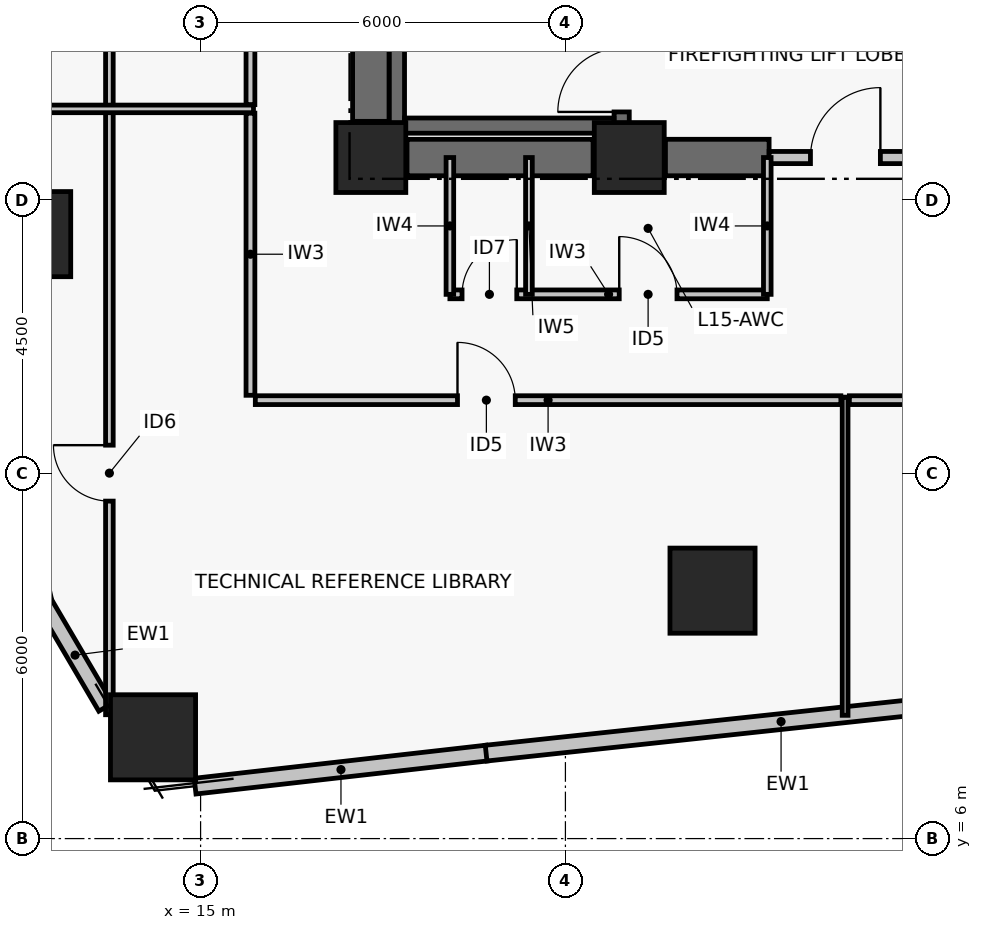
"""IFC4 building model, lengths in metres.
Left out: names, types, materials, properties, quantities, classifications, styles, units other than length and angle.
Written with IfcOpenShell. Run it as: python <this file> out.ifc"""

import sys

from ifc_helpers import new_model, si_unit, direction, frame, frame_2d, origin, origin_2d, place, context, subcontext, project, spatial, rectangle, hollow_rectangle, extrude, element, fill, save


model = new_model("IFC4")
c1 = context("Model", 3, precision=1e-05, world=origin(), true_north=direction((0.0, 1.0)))
c2 = subcontext(c1, "Body", "Model", "MODEL_VIEW")
j1 = project(units=[si_unit("LENGTHUNIT", "METRE"), si_unit("PLANEANGLEUNIT", "RADIAN")], contexts=[c1])
p1 = place(None, origin())
s1 = spatial("IfcSite", under=j1, at=p1, CompositionType="ELEMENT")
p2 = place(p1, origin())
s2 = spatial("IfcBuilding", under=s1, at=p2, CompositionType="ELEMENT")
p3 = place(p2, frame((0.0, 0.0, 64.8)))
s3 = spatial("IfcBuildingStorey", under=s2, at=p3, CompositionType="ELEMENT", Elevation=64.8)
for number, where, z_axis, x_axis in (
    (1, (17.8, 17.2, 0.0), (0.0, 0.0, 1.0), (1.0, 0.0, 0.0)),
    (2, (22.05, 17.2, 0.0), (0.0, 0.0, 1.0), (1.0, 0.0, 0.0)),
):
    element("IfcColumn", number, at=place(p3, frame(where, z_axis=z_axis, x_axis=x_axis)), inside=s3, PredefinedType="COLUMN", context=c2, shape_type="SweptSolid", body=[
        extrude(rectangle(XDim=1.15, YDim=1.15, at=origin_2d()), origin(), (0.0, 0.0, 1.0), 3.72),
    ])
p4 = place(p3, frame((18.395, 17.2, 0.0), z_axis=(0.0, 0.0, 1.0), x_axis=(1.0, 0.0, 0.0)))
e3 = element("IfcWall", 3, at=p4, inside=s3, PredefinedType="SHEAR", context=c2, shape_type="SweptSolid", body=[
    extrude(rectangle(XDim=3.06, YDim=0.6, at=frame_2d((1.53, 0.0))), origin(), (0.0, 0.0, 1.0), 3.44),
])
p5 = place(p3, frame((22.645, 17.2, 0.0), z_axis=(0.0, 0.0, 1.0), x_axis=(1.0, 0.0, 0.0)))
e4 = element("IfcWall", 4, at=p5, inside=s3, PredefinedType="SHEAR", context=c2, shape_type="SweptSolid", body=[
    extrude(rectangle(XDim=1.705, YDim=0.6, at=frame_2d((0.853, 0.0))), origin(), (0.0, 0.0, 1.0), 3.44),
])
p6 = place(p3, frame((17.8, 17.795, 0.0), z_axis=(0.0, 0.0, 1.0), x_axis=(0.0, 1.0, 0.0)))
e5 = element("IfcWall", 5, at=p6, inside=s3, PredefinedType="SHEAR", context=c2, shape_type="SweptSolid", body=[
    extrude(rectangle(XDim=8.41, YDim=0.6, at=frame_2d((4.205, 0.0))), origin(), (0.0, 0.0, 1.0), 3.44),
])
p7 = place(p3, frame((18.229, 17.6, 0.0), z_axis=(0.0, 0.0, 1.0), x_axis=(0.0, 1.0, 0.0)))
e6 = element("IfcWall", 6, at=p7, inside=s3, PredefinedType="SHEAR", context=c2, shape_type="SweptSolid", body=[
    extrude(rectangle(XDim=8.8, YDim=0.25, at=frame_2d((4.4, 0.0))), origin(), (0.0, 0.0, 1.0), 3.44),
])
p8 = place(p3, frame((21.925, 17.6, 0.0), z_axis=(0.0, 0.0, 1.0), x_axis=(0.0, 1.0, 0.0)))
e7 = element("IfcWall", 7, at=p8, inside=s3, PredefinedType="SHEAR", context=c2, shape_type="SweptSolid", body=[
    extrude(rectangle(XDim=8.8, YDim=0.25, at=frame_2d((4.4, 0.0))), origin(), (0.0, 0.0, 1.0), 3.44),
])
p9 = place(p8, frame((0.35, 0.0, 0.0)))
e8 = element("IfcOpeningElement", 8, at=p9, cuts=e7, PredefinedType="OPENING", context=c2, shape_type="SweptSolid", body=[
    extrude(rectangle(XDim=1.05, YDim=2.08, at=frame_2d((0.525, 1.04))), frame((0.0, 0.135, 0.0), z_axis=(0.0, -1.0, 0.0), x_axis=(1.0, 0.0, 0.0)), (0.0, 0.0, 1.0), 0.27),
])
p10 = place(p3, frame((18.354, 17.725, 0.0), z_axis=(0.0, 0.0, 1.0), x_axis=(1.0, 0.0, 0.0)))
e9 = element("IfcWall", 9, at=p10, inside=s3, PredefinedType="SHEAR", context=c2, shape_type="SweptSolid", body=[
    extrude(rectangle(XDim=3.446, YDim=0.25, at=frame_2d((1.723, 0.0))), origin(), (0.0, 0.0, 1.0), 3.44),
])
for number, where, z_axis, x_axis in (
    (10, (12.164, 15.94, 0.0), (0.0, 0.0, 1.0), (1.0, 0.0, 0.0)),
    (11, (14.218, 7.666, 0.0), (0.0, 0.0, 1.0), (1.0, 0.0, 0.0)),
    (12, (23.419, 10.077, 0.0), (0.0, 0.0, 1.0), (1.0, 0.0, 0.0)),
):
    element("IfcColumn", number, at=place(p3, frame(where, z_axis=z_axis, x_axis=x_axis)), inside=s3, PredefinedType="COLUMN", context=c2, shape_type="SweptSolid", body=[
        extrude(hollow_rectangle(XDim=1.4, YDim=1.4, WallThickness=0.055, at=origin_2d()), origin(), (0.0, 0.0, 1.0), 3.72),
    ])
p11 = place(p3, frame((13.438, 8.161, 0.0), z_axis=(0.0, 0.0, 1.0), x_axis=(-0.506772954594, 0.862079562739, 0.0)))
e13 = element("IfcWall", 13, at=p11, inside=s3, PredefinedType="PARTITIONING", context=c2, shape_type="SweptSolid", body=[
    extrude(rectangle(XDim=1.986, YDim=0.26, at=frame_2d((0.993, 0.0))), origin(), (0.0, 0.0, 1.0), 3.44),
])
p12 = place(p3, frame((19.708, 7.406, 0.0), z_axis=(0.0, 0.0, 1.0), x_axis=(-0.993630237788, -0.112689620435, 0.0)))
e14 = element("IfcWall", 14, at=p12, inside=s3, PredefinedType="PARTITIONING", context=c2, shape_type="SweptSolid", body=[
    extrude(rectangle(XDim=4.829, YDim=0.26, at=frame_2d((2.415, 0.0))), origin(), (0.0, 0.0, 1.0), 3.44),
])
p13 = place(p3, frame((29.398, 8.444, 0.0), z_axis=(0.0, 0.0, 1.0), x_axis=(-0.994319088673, -0.106440358419, 0.0)))
e15 = element("IfcWall", 15, at=p13, inside=s3, PredefinedType="PARTITIONING", context=c2, shape_type="SweptSolid", body=[
    extrude(rectangle(XDim=9.757, YDim=0.26, at=frame_2d((4.879, 0.0))), origin(), (0.0, 0.0, 1.0), 3.44),
])
p14 = place(p3, frame((24.35, 17.2, 0.0), z_axis=(0.0, 0.0, 1.0), x_axis=(1.0, 0.0, 0.0)))
e16 = element("IfcWall", 16, at=p14, inside=s3, PredefinedType="PARTITIONING", context=c2, shape_type="SweptSolid", body=[
    extrude(rectangle(XDim=2.5, YDim=0.2, at=frame_2d((1.25, 0.0))), origin(), (0.0, 0.0, 1.0), 2.57),
])
p15 = place(p14, frame((0.68, 0.0, 0.0)))
e17 = element("IfcOpeningElement", 17, at=p15, cuts=e16, PredefinedType="OPENING", context=c2, shape_type="SweptSolid", body=[
    extrude(rectangle(XDim=1.15, YDim=2.08, at=frame_2d((0.575, 1.04))), frame((0.0, 0.11, 0.0), z_axis=(0.0, -1.0, 0.0), x_axis=(1.0, 0.0, 0.0)), (0.0, 0.0, 1.0), 0.22),
])
p16 = place(p3, frame((19.1, 14.95, 0.0), z_axis=(0.0, 0.0, 1.0), x_axis=(1.0, 0.0, 0.0)))
e18 = element("IfcWall", 18, at=p16, inside=s3, PredefinedType="PARTITIONING", context=c2, shape_type="SweptSolid", body=[
    extrude(rectangle(XDim=5.22, YDim=0.145, at=frame_2d((2.61, 0.0))), origin(), (0.0, 0.0, 1.0), 2.57),
])
p17 = place(p16, frame((0.2, 0.0, 0.0)))
e19 = element("IfcOpeningElement", 19, at=p17, cuts=e18, PredefinedType="OPENING", context=c2, shape_type="SweptSolid", body=[
    extrude(rectangle(XDim=0.9, YDim=2.02, at=frame_2d((0.45, 1.01))), frame((0.0, 0.083, 0.0), z_axis=(0.0, -1.0, 0.0), x_axis=(1.0, 0.0, 0.0)), (0.0, 0.0, 1.0), 0.165),
])
p18 = place(p16, frame((2.785, 0.0, 0.0)))
e20 = element("IfcOpeningElement", 20, at=p18, cuts=e18, PredefinedType="OPENING", context=c2, shape_type="SweptSolid", body=[
    extrude(rectangle(XDim=0.95, YDim=2.06, at=frame_2d((0.475, 1.03))), frame((0.0, 0.083, 0.0), z_axis=(0.0, -1.0, 0.0), x_axis=(1.0, 0.0, 0.0)), (0.0, 0.0, 1.0), 0.165),
])
p19 = place(p3, frame((19.1, 14.95, 0.0), z_axis=(0.0, 0.0, 1.0), x_axis=(0.0, 1.0, 0.0)))
e21 = element("IfcWall", 21, at=p19, inside=s3, PredefinedType="PARTITIONING", context=c2, shape_type="SweptSolid", body=[
    extrude(rectangle(XDim=2.25, YDim=0.125, at=frame_2d((1.125, 0.0))), origin(), (0.0, 0.0, 1.0), 2.57),
])
p20 = place(p3, frame((20.4, 14.95, 0.0), z_axis=(0.0, 0.0, 1.0), x_axis=(0.0, 1.0, 0.0)))
e22 = element("IfcWall", 22, at=p20, inside=s3, PredefinedType="PARTITIONING", context=c2, shape_type="SweptSolid", body=[
    extrude(rectangle(XDim=2.25, YDim=0.11, at=frame_2d((1.125, 0.0))), origin(), (0.0, 0.0, 1.0), 2.57),
])
p21 = place(p3, frame((24.32, 14.95, 0.0), z_axis=(0.0, 0.0, 1.0), x_axis=(0.0, 1.0, 0.0)))
e23 = element("IfcWall", 23, at=p21, inside=s3, PredefinedType="PARTITIONING", context=c2, shape_type="SweptSolid", body=[
    extrude(rectangle(XDim=2.25, YDim=0.125, at=frame_2d((1.125, 0.0))), origin(), (0.0, 0.0, 1.0), 2.57),
])
p22 = place(p3, frame((15.82, 17.93, 0.0), z_axis=(0.0, 0.0, 1.0), x_axis=(0.0, -1.0, 0.0)))
e24 = element("IfcWall", 24, at=p22, inside=s3, PredefinedType="PARTITIONING", context=c2, shape_type="SweptSolid", body=[
    extrude(rectangle(XDim=4.64, YDim=0.145, at=frame_2d((2.32, 0.0))), origin(), (0.0, 0.0, 1.0), 2.57),
])
p23 = place(p3, frame((15.9, 13.21, 0.0), z_axis=(0.0, 0.0, 1.0), x_axis=(1.0, 0.0, 0.0)))
e25 = element("IfcWall", 25, at=p23, inside=s3, PredefinedType="PARTITIONING", context=c2, shape_type="SweptSolid", body=[
    extrude(rectangle(XDim=9.63, YDim=0.145, at=frame_2d((4.815, 0.0))), origin(), (0.0, 0.0, 1.0), 2.57),
])
p24 = place(p23, frame((3.325, 0.0, 0.0)))
e26 = element("IfcOpeningElement", 26, at=p24, cuts=e25, PredefinedType="OPENING", context=c2, shape_type="SweptSolid", body=[
    extrude(rectangle(XDim=0.95, YDim=2.06, at=frame_2d((0.475, 1.03))), frame((0.0, 0.083, 0.0), z_axis=(0.0, -1.0, 0.0), x_axis=(1.0, 0.0, 0.0)), (0.0, 0.0, 1.0), 0.165),
])
p25 = place(p3, frame((25.67, 13.21, 0.0), z_axis=(0.0, 0.0, 1.0), x_axis=(1.0, 0.0, 0.0)))
e27 = element("IfcWall", 27, at=p25, inside=s3, PredefinedType="PARTITIONING", context=c2, shape_type="SweptSolid", body=[
    extrude(rectangle(XDim=7.13, YDim=0.145, at=frame_2d((3.565, 0.0))), origin(), (0.0, 0.0, 1.0), 2.82),
])
p26 = place(p25, frame((5.224, 0.0, 0.0)))
e28 = element("IfcOpeningElement", 28, at=p26, cuts=e27, PredefinedType="OPENING", context=c2, shape_type="SweptSolid", body=[
    extrude(rectangle(XDim=0.92, YDim=2.05, at=frame_2d((0.46, 1.025))), frame((0.0, 0.083, 0.0), z_axis=(0.0, -1.0, 0.0), x_axis=(1.0, 0.0, 0.0)), (0.0, 0.0, 1.0), 0.165),
])
p27 = place(p3, frame((15.82, 25.93, 0.0), z_axis=(0.0, 0.0, 1.0), x_axis=(0.0, -1.0, 0.0)))
e29 = element("IfcWall", 29, at=p27, inside=s3, PredefinedType="PARTITIONING", context=c2, shape_type="SweptSolid", body=[
    extrude(rectangle(XDim=7.86, YDim=0.145, at=frame_2d((3.93, 0.0))), origin(), (0.0, 0.0, 1.0), 2.97),
])
p28 = place(p27, frame((3.455, 0.0, 0.0)))
e30 = element("IfcOpeningElement", 30, at=p28, cuts=e29, PredefinedType="OPENING", context=c2, shape_type="SweptSolid", body=[
    extrude(rectangle(XDim=0.95, YDim=2.06, at=frame_2d((0.475, 1.03))), frame((0.0, 0.083, 0.0), z_axis=(0.0, -1.0, 0.0), x_axis=(1.0, 0.0, 0.0)), (0.0, 0.0, 1.0), 0.165),
])
p29 = place(p3, frame((13.5, 8.037, 0.0), z_axis=(0.0, 0.0, 1.0), x_axis=(0.0, 1.0, 0.0)))
e31 = element("IfcWall", 31, at=p29, inside=s3, PredefinedType="PARTITIONING", context=c2, shape_type="SweptSolid", body=[
    extrude(rectangle(XDim=27.926, YDim=0.125, at=frame_2d((13.963, 0.0))), origin(), (0.0, 0.0, 1.0), 2.57),
])
p30 = place(p29, frame((3.513, 0.0, 0.0)))
e32 = element("IfcOpeningElement", 32, at=p30, cuts=e31, PredefinedType="OPENING", context=c2, shape_type="SweptSolid", body=[
    extrude(rectangle(XDim=0.92, YDim=2.05, at=frame_2d((0.46, 1.025))), frame((0.0, 0.073, 0.0), z_axis=(0.0, -1.0, 0.0), x_axis=(1.0, 0.0, 0.0)), (0.0, 0.0, 1.0), 0.145),
])
p31 = place(p29, frame((23.493, 0.0, 0.0)))
e33 = element("IfcOpeningElement", 33, at=p31, cuts=e31, PredefinedType="OPENING", context=c2, shape_type="SweptSolid", body=[
    extrude(rectangle(XDim=0.92, YDim=2.05, at=frame_2d((0.46, 1.025))), frame((0.0, 0.073, 0.0), z_axis=(0.0, -1.0, 0.0), x_axis=(1.0, 0.0, 0.0)), (0.0, 0.0, 1.0), 0.145),
])
p32 = place(p29, frame((13.503, 0.0, 0.0)))
e34 = element("IfcOpeningElement", 34, at=p32, cuts=e31, PredefinedType="OPENING", context=c2, shape_type="SweptSolid", body=[
    extrude(rectangle(XDim=0.92, YDim=2.05, at=frame_2d((0.46, 1.025))), frame((0.0, 0.073, 0.0), z_axis=(0.0, -1.0, 0.0), x_axis=(1.0, 0.0, 0.0)), (0.0, 0.0, 1.0), 0.145),
])
p33 = place(p3, frame((25.6, 8.027, 0.0), z_axis=(0.0, 0.0, 1.0), x_axis=(0.0, 1.0, 0.0)))
e35 = element("IfcWall", 35, at=p33, inside=s3, PredefinedType="PARTITIONING", context=c2, shape_type="SweptSolid", body=[
    extrude(rectangle(XDim=5.233, YDim=0.095, at=frame_2d((2.616, 0.0))), origin(), (0.0, 0.0, 1.0), 2.82),
])
p34 = place(p3, frame((10.9, 18.0, 0.0), z_axis=(0.0, 0.0, 1.0), x_axis=(1.0, 0.0, 0.0)))
e36 = element("IfcWall", 36, at=p34, inside=s3, PredefinedType="PARTITIONING", context=c2, shape_type="SweptSolid", body=[
    extrude(rectangle(XDim=4.97, YDim=0.125, at=frame_2d((2.485, 0.0))), origin(), (0.0, 0.0, 1.0), 2.82),
])
p35 = place(p9, origin())
e37 = element("IfcDoor", 37, at=p35, inside=s3, OperationType="SINGLE_SWING_LEFT", PredefinedType="DOOR", context=c2, shape_type="SweptSolid", body=[
    extrude(rectangle(XDim=1.05, YDim=2.08, at=frame_2d((0.525, 1.04))), frame((0.0, 0.025, 0.0), z_axis=(0.0, -1.0, 0.0), x_axis=(1.0, 0.0, 0.0)), (0.0, 0.0, 1.0), 0.05),
])
fill(e8, e37)
p36 = place(p15, origin())
e38 = element("IfcDoor", 38, at=p36, inside=s3, OperationType="SINGLE_SWING_RIGHT", PredefinedType="DOOR", context=c2, shape_type="SweptSolid", body=[
    extrude(rectangle(XDim=1.15, YDim=2.08, at=frame_2d((0.575, 1.04))), frame((0.0, 0.025, 0.0), z_axis=(0.0, -1.0, 0.0), x_axis=(1.0, 0.0, 0.0)), (0.0, 0.0, 1.0), 0.05),
])
fill(e17, e38)
p37 = place(p17, origin())
e39 = element("IfcDoor", 39, at=p37, inside=s3, OperationType="SINGLE_SWING_RIGHT", PredefinedType="DOOR", context=c2, shape_type="SweptSolid", body=[
    extrude(rectangle(XDim=0.9, YDim=2.02, at=frame_2d((0.45, 1.01))), frame((0.0, 0.025, 0.0), z_axis=(0.0, -1.0, 0.0), x_axis=(1.0, 0.0, 0.0)), (0.0, 0.0, 1.0), 0.05),
])
fill(e19, e39)
p38 = place(p18, origin())
e40 = element("IfcDoor", 40, at=p38, inside=s3, OperationType="SINGLE_SWING_LEFT", PredefinedType="DOOR", context=c2, shape_type="SweptSolid", body=[
    extrude(rectangle(XDim=0.95, YDim=2.06, at=frame_2d((0.475, 1.03))), frame((0.0, 0.025, 0.0), z_axis=(0.0, -1.0, 0.0), x_axis=(1.0, 0.0, 0.0)), (0.0, 0.0, 1.0), 0.05),
])
fill(e20, e40)
p39 = place(p24, origin())
e41 = element("IfcDoor", 41, at=p39, inside=s3, OperationType="SINGLE_SWING_LEFT", PredefinedType="DOOR", context=c2, shape_type="SweptSolid", body=[
    extrude(rectangle(XDim=0.95, YDim=2.06, at=frame_2d((0.475, 1.03))), frame((0.0, 0.025, 0.0), z_axis=(0.0, -1.0, 0.0), x_axis=(1.0, 0.0, 0.0)), (0.0, 0.0, 1.0), 0.05),
])
fill(e26, e41)
p40 = place(p30, origin())
e42 = element("IfcDoor", 42, at=p40, inside=s3, OperationType="SINGLE_SWING_RIGHT", PredefinedType="DOOR", context=c2, shape_type="SweptSolid", body=[
    extrude(rectangle(XDim=0.92, YDim=2.05, at=frame_2d((0.46, 1.025))), frame((0.0, 0.025, 0.0), z_axis=(0.0, -1.0, 0.0), x_axis=(1.0, 0.0, 0.0)), (0.0, 0.0, 1.0), 0.05),
])
fill(e32, e42)
save(model, sys.argv[1])
